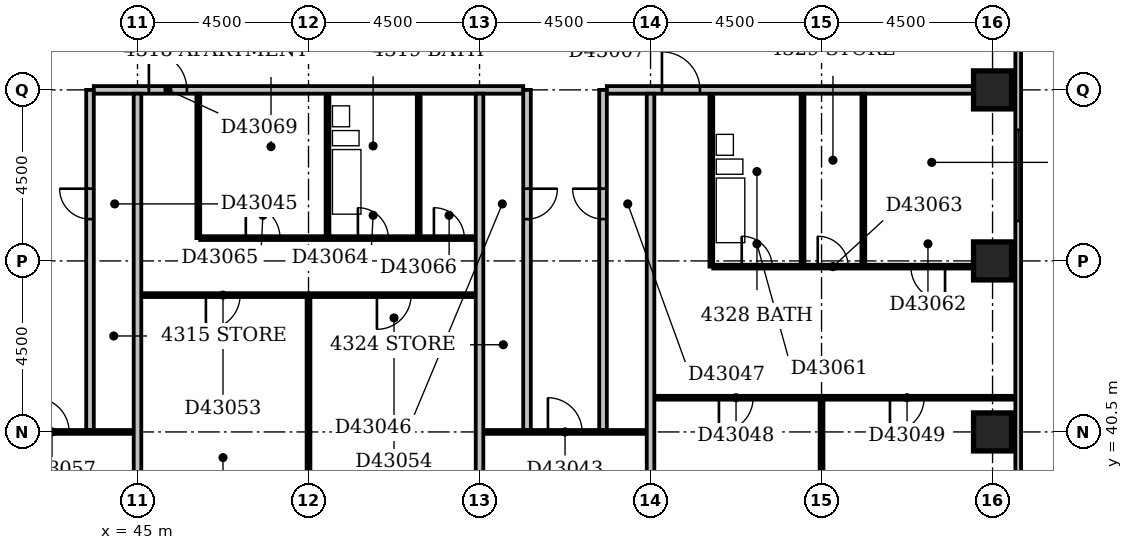
"""IFC4 building model, lengths in metres.
Left out: names, types, materials, properties, quantities, classifications, styles, units other than length and angle.
Written with IfcOpenShell. Run it as: python <this file> out.ifc"""

import sys

from ifc_helpers import new_model, si_unit, direction, frame, frame_2d, origin, origin_2d, place, context, subcontext, project, spatial, rectangle, extrude, element, fill, save


model = new_model("IFC4")
c1 = context("Model", 3, precision=1e-05, world=origin(), true_north=direction((0.0, 1.0)))
c2 = subcontext(c1, "Body", "Model", "MODEL_VIEW")
j1 = project(units=[si_unit("LENGTHUNIT", "METRE"), si_unit("PLANEANGLEUNIT", "RADIAN")], contexts=[c1])
p1 = place(None, origin())
s1 = spatial("IfcSite", under=j1, at=p1, CompositionType="ELEMENT")
p2 = place(p1, origin())
s2 = spatial("IfcBuilding", under=s1, at=p2, CompositionType="ELEMENT")
p3 = place(p2, frame((0.0, 0.0, 170.0)))
s3 = spatial("IfcBuildingStorey", under=s2, at=p3, CompositionType="ELEMENT", Elevation=170.0)
for number, where, z_axis, x_axis in (
    (1, (67.5, 40.5, -0.3), (0.0, 0.0, 1.0), (1.0, 0.0, 0.0)),
    (2, (67.5, 45.0, -0.3), (0.0, 0.0, 1.0), (1.0, 0.0, 0.0)),
    (3, (67.5, 49.5, -0.3), (0.0, 0.0, 1.0), (1.0, 0.0, 0.0)),
):
    element("IfcColumn", number, at=place(p3, frame(where, z_axis=z_axis, x_axis=x_axis)), inside=s3, PredefinedType="COLUMN", context=c2, shape_type="SweptSolid", body=[
        extrude(rectangle(XDim=1.0, YDim=1.0, at=origin_2d()), origin(), (0.0, 0.0, 1.0), 3.45),
    ])
p4 = place(p3, frame((68.175, 35.4, 0.0), z_axis=(0.0, 0.0, 1.0), x_axis=(0.0, 1.0, 0.0)))
e4 = element("IfcWall", 4, at=p4, inside=s3, PredefinedType="STANDARD", context=c2, shape_type="SweptSolid", body=[
    extrude(rectangle(XDim=23.85, YDim=0.15, at=frame_2d((11.925, 0.0))), origin(), (0.0, 0.0, 1.0), 2.5),
])
p5 = place(p4, frame((1.65, 0.0, 0.6)))
e5 = element("IfcOpeningElement", 5, at=p5, cuts=e4, PredefinedType="OPENING", context=c2, shape_type="SweptSolid", body=[
    extrude(rectangle(XDim=2.4, YDim=1.8, at=frame_2d((1.2, 0.9))), frame((0.0, 0.087, 0.0), z_axis=(0.0, -1.0, 0.0), x_axis=(1.0, 0.0, 0.0)), (0.0, 0.0, 1.0), 0.174),
])
p6 = place(p4, frame((10.65, 0.0, 0.6)))
e6 = element("IfcOpeningElement", 6, at=p6, cuts=e4, PredefinedType="OPENING", context=c2, shape_type="SweptSolid", body=[
    extrude(rectangle(XDim=2.4, YDim=1.8, at=frame_2d((1.2, 0.9))), frame((0.0, 0.087, 0.0), z_axis=(0.0, -1.0, 0.0), x_axis=(1.0, 0.0, 0.0)), (0.0, 0.0, 1.0), 0.174),
])
p7 = place(p4, frame((19.65, 0.0, 0.6)))
e7 = element("IfcOpeningElement", 7, at=p7, cuts=e4, PredefinedType="OPENING", context=c2, shape_type="SweptSolid", body=[
    extrude(rectangle(XDim=2.4, YDim=1.8, at=frame_2d((1.2, 0.9))), frame((0.0, 0.087, 0.0), z_axis=(0.0, -1.0, 0.0), x_axis=(1.0, 0.0, 0.0)), (0.0, 0.0, 1.0), 0.174),
])
p8 = place(p3, frame((45.0, 36.5, 0.0), z_axis=(0.0, 0.0, 1.0), x_axis=(0.0, 1.0, 0.0)))
e8 = element("IfcWall", 8, at=p8, inside=s3, PredefinedType="PARTITIONING", context=c2, shape_type="SweptSolid", body=[
    extrude(rectangle(XDim=12.9, YDim=0.2, at=frame_2d((6.45, 0.0))), origin(), (0.0, 0.0, 1.0), 2.45),
])
p9 = place(p3, frame((49.5, 36.5, 0.0), z_axis=(0.0, 0.0, 1.0), x_axis=(0.0, 1.0, 0.0)))
e9 = element("IfcWall", 9, at=p9, inside=s3, PredefinedType="PARTITIONING", context=c2, shape_type="SweptSolid", body=[
    extrude(rectangle(XDim=7.55, YDim=0.1, at=frame_2d((3.775, 0.0))), origin(), (0.0, 0.0, 1.0), 3.15),
])
p10 = place(p3, frame((54.0, 36.5, 0.0), z_axis=(0.0, 0.0, 1.0), x_axis=(0.0, 1.0, 0.0)))
e10 = element("IfcWall", 10, at=p10, inside=s3, PredefinedType="PARTITIONING", context=c2, shape_type="SweptSolid", body=[
    extrude(rectangle(XDim=12.9, YDim=0.2, at=frame_2d((6.45, 0.0))), origin(), (0.0, 0.0, 1.0), 2.45),
])
p11 = place(p3, frame((58.5, 36.5, 0.0), z_axis=(0.0, 0.0, 1.0), x_axis=(0.0, 1.0, 0.0)))
e11 = element("IfcWall", 11, at=p11, inside=s3, PredefinedType="PARTITIONING", context=c2, shape_type="SweptSolid", body=[
    extrude(rectangle(XDim=12.9, YDim=0.2, at=frame_2d((6.45, 0.0))), origin(), (0.0, 0.0, 1.0), 3.15),
])
p12 = place(p3, frame((63.0, 36.5, 0.0), z_axis=(0.0, 0.0, 1.0), x_axis=(0.0, 1.0, 0.0)))
e12 = element("IfcWall", 12, at=p12, inside=s3, PredefinedType="PARTITIONING", context=c2, shape_type="SweptSolid", body=[
    extrude(rectangle(XDim=4.85, YDim=0.1, at=frame_2d((2.425, 0.0))), origin(), (0.0, 0.0, 1.0), 2.25),
])
p13 = place(p3, frame((40.6, 40.5, 0.0), z_axis=(0.0, 0.0, 1.0), x_axis=(1.0, 0.0, 0.0)))
e13 = element("IfcWall", 13, at=p13, inside=s3, PredefinedType="PARTITIONING", context=c2, shape_type="SweptSolid", body=[
    extrude(rectangle(XDim=4.3, YDim=0.1, at=frame_2d((2.15, 0.0))), origin(), (0.0, 0.0, 1.0), 3.15),
])
p14 = place(p13, frame((1.7, 0.0, 0.0)))
e14 = element("IfcOpeningElement", 14, at=p14, cuts=e13, PredefinedType="OPENING", context=c2, shape_type="SweptSolid", body=[
    extrude(rectangle(XDim=0.9, YDim=2.1, at=frame_2d((0.45, 1.05))), frame((0.0, 0.062, 0.0), z_axis=(0.0, -1.0, 0.0), x_axis=(1.0, 0.0, 0.0)), (0.0, 0.0, 1.0), 0.124),
])
p15 = place(p3, frame((54.1, 40.5, 0.0), z_axis=(0.0, 0.0, 1.0), x_axis=(1.0, 0.0, 0.0)))
e15 = element("IfcWall", 15, at=p15, inside=s3, PredefinedType="PARTITIONING", context=c2, shape_type="SweptSolid", body=[
    extrude(rectangle(XDim=4.3, YDim=0.1, at=frame_2d((2.15, 0.0))), origin(), (0.0, 0.0, 1.0), 3.15),
])
p16 = place(p15, frame((1.7, 0.0, 0.0)))
e16 = element("IfcOpeningElement", 16, at=p16, cuts=e15, PredefinedType="OPENING", context=c2, shape_type="SweptSolid", body=[
    extrude(rectangle(XDim=0.9, YDim=2.1, at=frame_2d((0.45, 1.05))), frame((0.0, 0.062, 0.0), z_axis=(0.0, -1.0, 0.0), x_axis=(1.0, 0.0, 0.0)), (0.0, 0.0, 1.0), 0.124),
])
p17 = place(p3, frame((43.75, 40.55, 0.0), z_axis=(0.0, 0.0, 1.0), x_axis=(0.0, 1.0, 0.0)))
e17 = element("IfcWall", 17, at=p17, inside=s3, PredefinedType="PARTITIONING", context=c2, shape_type="SweptSolid", body=[
    extrude(rectangle(XDim=8.95, YDim=0.2, at=frame_2d((4.475, 0.0))), origin(), (0.0, 0.0, 1.0), 3.15),
])
p18 = place(p17, frame((5.55, 0.0, 0.0)))
e18 = element("IfcOpeningElement", 18, at=p18, cuts=e17, PredefinedType="OPENING", context=c2, shape_type="SweptSolid", body=[
    extrude(rectangle(XDim=0.8, YDim=2.1, at=frame_2d((0.4, 1.05))), frame((0.0, 0.112, 0.0), z_axis=(0.0, -1.0, 0.0), x_axis=(1.0, 0.0, 0.0)), (0.0, 0.0, 1.0), 0.224),
])
p19 = place(p3, frame((55.25, 40.55, 0.0), z_axis=(0.0, 0.0, 1.0), x_axis=(0.0, 1.0, 0.0)))
e19 = element("IfcWall", 19, at=p19, inside=s3, PredefinedType="PARTITIONING", context=c2, shape_type="SweptSolid", body=[
    extrude(rectangle(XDim=8.95, YDim=0.2, at=frame_2d((4.475, 0.0))), origin(), (0.0, 0.0, 1.0), 3.15),
])
p20 = place(p19, frame((5.55, 0.0, 0.0)))
e20 = element("IfcOpeningElement", 20, at=p20, cuts=e19, PredefinedType="OPENING", context=c2, shape_type="SweptSolid", body=[
    extrude(rectangle(XDim=0.8, YDim=2.1, at=frame_2d((0.4, 1.05))), frame((0.0, 0.112, 0.0), z_axis=(0.0, -1.0, 0.0), x_axis=(1.0, 0.0, 0.0)), (0.0, 0.0, 1.0), 0.224),
])
p21 = place(p3, frame((57.25, 40.55, 0.0), z_axis=(0.0, 0.0, 1.0), x_axis=(0.0, 1.0, 0.0)))
e21 = element("IfcWall", 21, at=p21, inside=s3, PredefinedType="PARTITIONING", context=c2, shape_type="SweptSolid", body=[
    extrude(rectangle(XDim=8.95, YDim=0.2, at=frame_2d((4.475, 0.0))), origin(), (0.0, 0.0, 1.0), 3.15),
])
p22 = place(p21, frame((5.55, 0.0, 0.0)))
e22 = element("IfcOpeningElement", 22, at=p22, cuts=e21, PredefinedType="OPENING", context=c2, shape_type="SweptSolid", body=[
    extrude(rectangle(XDim=0.8, YDim=2.1, at=frame_2d((0.4, 1.05))), frame((0.0, 0.112, 0.0), z_axis=(0.0, -1.0, 0.0), x_axis=(1.0, 0.0, 0.0)), (0.0, 0.0, 1.0), 0.224),
])
p23 = place(p3, frame((58.6, 41.4, 0.0), z_axis=(0.0, 0.0, 1.0), x_axis=(1.0, 0.0, 0.0)))
e23 = element("IfcWall", 23, at=p23, inside=s3, PredefinedType="PARTITIONING", context=c2, shape_type="SweptSolid", body=[
    extrude(rectangle(XDim=9.5, YDim=0.1, at=frame_2d((4.75, 0.0))), origin(), (0.0, 0.0, 1.0), 3.15),
])
p24 = place(p23, frame((1.7, 0.0, 0.0)))
e24 = element("IfcOpeningElement", 24, at=p24, cuts=e23, PredefinedType="OPENING", context=c2, shape_type="SweptSolid", body=[
    extrude(rectangle(XDim=0.9, YDim=2.1, at=frame_2d((0.45, 1.05))), frame((0.0, 0.062, 0.0), z_axis=(0.0, -1.0, 0.0), x_axis=(1.0, 0.0, 0.0)), (0.0, 0.0, 1.0), 0.124),
])
p25 = place(p23, frame((6.2, 0.0, 0.0)))
e25 = element("IfcOpeningElement", 25, at=p25, cuts=e23, PredefinedType="OPENING", context=c2, shape_type="SweptSolid", body=[
    extrude(rectangle(XDim=0.9, YDim=2.1, at=frame_2d((0.45, 1.05))), frame((0.0, 0.062, 0.0), z_axis=(0.0, -1.0, 0.0), x_axis=(1.0, 0.0, 0.0)), (0.0, 0.0, 1.0), 0.124),
])
p26 = place(p3, frame((45.1, 44.1, 0.0), z_axis=(0.0, 0.0, 1.0), x_axis=(1.0, 0.0, 0.0)))
e26 = element("IfcWall", 26, at=p26, inside=s3, PredefinedType="PARTITIONING", context=c2, shape_type="SweptSolid", body=[
    extrude(rectangle(XDim=8.8, YDim=0.1, at=frame_2d((4.4, 0.0))), origin(), (0.0, 0.0, 1.0), 3.15),
])
p27 = place(p26, frame((1.7, 0.0, 0.0)))
e27 = element("IfcOpeningElement", 27, at=p27, cuts=e26, PredefinedType="OPENING", context=c2, shape_type="SweptSolid", body=[
    extrude(rectangle(XDim=0.9, YDim=2.1, at=frame_2d((0.45, 1.05))), frame((0.0, 0.062, 0.0), z_axis=(0.0, -1.0, 0.0), x_axis=(1.0, 0.0, 0.0)), (0.0, 0.0, 1.0), 0.124),
])
p28 = place(p26, frame((6.2, 0.0, 0.0)))
e28 = element("IfcOpeningElement", 28, at=p28, cuts=e26, PredefinedType="OPENING", context=c2, shape_type="SweptSolid", body=[
    extrude(rectangle(XDim=0.9, YDim=2.1, at=frame_2d((0.45, 1.05))), frame((0.0, 0.062, 0.0), z_axis=(0.0, -1.0, 0.0), x_axis=(1.0, 0.0, 0.0)), (0.0, 0.0, 1.0), 0.124),
])
p29 = place(p3, frame((60.1, 44.85, 0.0), z_axis=(0.0, 0.0, 1.0), x_axis=(0.0, 1.0, 0.0)))
e29 = element("IfcWall", 29, at=p29, inside=s3, PredefinedType="PLUMBINGWALL", context=c2, shape_type="SweptSolid", body=[
    extrude(rectangle(XDim=4.55, YDim=0.1, at=frame_2d((2.275, 0.0))), origin(), (0.0, 0.0, 1.0), 3.15),
])
p30 = place(p3, frame((60.15, 44.85, 0.0), z_axis=(0.0, 0.0, 1.0), x_axis=(1.0, 0.0, 0.0)))
e30 = element("IfcWall", 30, at=p30, inside=s3, PredefinedType="PARTITIONING", context=c2, shape_type="SweptSolid", body=[
    extrude(rectangle(XDim=6.85, YDim=0.1, at=frame_2d((3.425, 0.0))), origin(), (0.0, 0.0, 1.0), 3.15),
])
p31 = place(p30, frame((0.75, 0.0, 0.0)))
e31 = element("IfcOpeningElement", 31, at=p31, cuts=e30, PredefinedType="OPENING", context=c2, shape_type="SweptSolid", body=[
    extrude(rectangle(XDim=0.8, YDim=2.1, at=frame_2d((0.4, 1.05))), frame((0.0, 0.062, 0.0), z_axis=(0.0, -1.0, 0.0), x_axis=(1.0, 0.0, 0.0)), (0.0, 0.0, 1.0), 0.124),
])
p32 = place(p30, frame((5.2, 0.0, 0.0)))
e32 = element("IfcOpeningElement", 32, at=p32, cuts=e30, PredefinedType="OPENING", context=c2, shape_type="SweptSolid", body=[
    extrude(rectangle(XDim=0.9, YDim=2.1, at=frame_2d((0.45, 1.05))), frame((0.0, 0.062, 0.0), z_axis=(0.0, -1.0, 0.0), x_axis=(1.0, 0.0, 0.0)), (0.0, 0.0, 1.0), 0.124),
])
p33 = place(p30, frame((2.75, 0.0, 0.0)))
e33 = element("IfcOpeningElement", 33, at=p33, cuts=e30, PredefinedType="OPENING", context=c2, shape_type="SweptSolid", body=[
    extrude(rectangle(XDim=0.8, YDim=2.1, at=frame_2d((0.4, 1.05))), frame((0.0, 0.062, 0.0), z_axis=(0.0, -1.0, 0.0), x_axis=(1.0, 0.0, 0.0)), (0.0, 0.0, 1.0), 0.124),
])
p34 = place(p3, frame((62.5, 44.9, 0.0), z_axis=(0.0, 0.0, 1.0), x_axis=(0.0, 1.0, 0.0)))
e34 = element("IfcWall", 34, at=p34, inside=s3, PredefinedType="PLUMBINGWALL", context=c2, shape_type="SweptSolid", body=[
    extrude(rectangle(XDim=4.5, YDim=0.1, at=frame_2d((2.25, 0.0))), origin(), (0.0, 0.0, 1.0), 2.25),
])
p35 = place(p3, frame((64.1, 44.9, 0.0), z_axis=(0.0, 0.0, 1.0), x_axis=(0.0, 1.0, 0.0)))
e35 = element("IfcWall", 35, at=p35, inside=s3, PredefinedType="PARTITIONING", context=c2, shape_type="SweptSolid", body=[
    extrude(rectangle(XDim=4.5, YDim=0.1, at=frame_2d((2.25, 0.0))), origin(), (0.0, 0.0, 1.0), 3.15),
])
p36 = place(p3, frame((46.6, 45.6, 0.0), z_axis=(0.0, 0.0, 1.0), x_axis=(0.0, 1.0, 0.0)))
e36 = element("IfcWall", 36, at=p36, inside=s3, PredefinedType="PARTITIONING", context=c2, shape_type="SweptSolid", body=[
    extrude(rectangle(XDim=3.8, YDim=0.1, at=frame_2d((1.9, 0.0))), origin(), (0.0, 0.0, 1.0), 3.15),
])
p37 = place(p3, frame((46.65, 45.6, 0.0), z_axis=(0.0, 0.0, 1.0), x_axis=(1.0, 0.0, 0.0)))
e37 = element("IfcWall", 37, at=p37, inside=s3, PredefinedType="PARTITIONING", context=c2, shape_type="SweptSolid", body=[
    extrude(rectangle(XDim=7.25, YDim=0.1, at=frame_2d((3.625, 0.0))), origin(), (0.0, 0.0, 1.0), 3.15),
])
p38 = place(p37, frame((4.15, 0.0, 0.0)))
e38 = element("IfcOpeningElement", 38, at=p38, cuts=e37, PredefinedType="OPENING", context=c2, shape_type="SweptSolid", body=[
    extrude(rectangle(XDim=0.8, YDim=2.1, at=frame_2d((0.4, 1.05))), frame((0.0, 0.062, 0.0), z_axis=(0.0, -1.0, 0.0), x_axis=(1.0, 0.0, 0.0)), (0.0, 0.0, 1.0), 0.124),
])
p39 = place(p37, frame((1.2, 0.0, 0.0)))
e39 = element("IfcOpeningElement", 39, at=p39, cuts=e37, PredefinedType="OPENING", context=c2, shape_type="SweptSolid", body=[
    extrude(rectangle(XDim=0.9, YDim=2.1, at=frame_2d((0.45, 1.05))), frame((0.0, 0.062, 0.0), z_axis=(0.0, -1.0, 0.0), x_axis=(1.0, 0.0, 0.0)), (0.0, 0.0, 1.0), 0.124),
])
p40 = place(p37, frame((6.15, 0.0, 0.0)))
e40 = element("IfcOpeningElement", 40, at=p40, cuts=e37, PredefinedType="OPENING", context=c2, shape_type="SweptSolid", body=[
    extrude(rectangle(XDim=0.8, YDim=2.1, at=frame_2d((0.4, 1.05))), frame((0.0, 0.062, 0.0), z_axis=(0.0, -1.0, 0.0), x_axis=(1.0, 0.0, 0.0)), (0.0, 0.0, 1.0), 0.124),
])
for number, where, z_axis, x_axis in (
    (41, (50.0, 45.65, 0.0), (0.0, 0.0, 1.0), (0.0, 1.0, 0.0)),
    (42, (52.4, 45.65, 0.0), (0.0, 0.0, 1.0), (0.0, 1.0, 0.0)),
):
    element("IfcWall", number, at=place(p3, frame(where, z_axis=z_axis, x_axis=x_axis)), inside=s3, PredefinedType="PLUMBINGWALL", context=c2, shape_type="SweptSolid", body=[
        extrude(rectangle(XDim=3.75, YDim=0.1, at=frame_2d((1.875, 0.0))), origin(), (0.0, 0.0, 1.0), 3.15),
    ])
p41 = place(p3, frame((43.85, 49.5, 0.0), z_axis=(0.0, 0.0, 1.0), x_axis=(1.0, 0.0, 0.0)))
e43 = element("IfcWall", 43, at=p41, inside=s3, PredefinedType="PARTITIONING", context=c2, shape_type="SweptSolid", body=[
    extrude(rectangle(XDim=11.3, YDim=0.2, at=frame_2d((5.65, 0.0))), origin(), (0.0, 0.0, 1.0), 3.15),
])
p42 = place(p41, frame((1.45, 0.0, 0.0)))
e44 = element("IfcOpeningElement", 44, at=p42, cuts=e43, PredefinedType="OPENING", context=c2, shape_type="SweptSolid", body=[
    extrude(rectangle(XDim=1.0, YDim=2.1, at=frame_2d((0.5, 1.05))), frame((0.0, 0.112, 0.0), z_axis=(0.0, -1.0, 0.0), x_axis=(1.0, 0.0, 0.0)), (0.0, 0.0, 1.0), 0.224),
])
p43 = place(p3, frame((57.35, 49.5, 0.0), z_axis=(0.0, 0.0, 1.0), x_axis=(1.0, 0.0, 0.0)))
e45 = element("IfcWall", 45, at=p43, inside=s3, PredefinedType="PARTITIONING", context=c2, shape_type="SweptSolid", body=[
    extrude(rectangle(XDim=9.65, YDim=0.2, at=frame_2d((4.825, 0.0))), origin(), (0.0, 0.0, 1.0), 3.15),
])
p44 = place(p43, frame((1.45, 0.0, 0.0)))
e46 = element("IfcOpeningElement", 46, at=p44, cuts=e45, PredefinedType="OPENING", context=c2, shape_type="SweptSolid", body=[
    extrude(rectangle(XDim=1.0, YDim=2.1, at=frame_2d((0.5, 1.05))), frame((0.0, 0.112, 0.0), z_axis=(0.0, -1.0, 0.0), x_axis=(1.0, 0.0, 0.0)), (0.0, 0.0, 1.0), 0.224),
])
p45 = place(p6, origin())
e47 = element("IfcWindow", 47, at=p45, inside=s3, PartitioningType="SINGLE_PANEL", PredefinedType="WINDOW", context=c2, shape_type="SweptSolid", body=[
    extrude(rectangle(XDim=2.4, YDim=1.8, at=frame_2d((1.2, 0.9))), frame((0.0, 0.03, 0.0), z_axis=(0.0, -1.0, 0.0), x_axis=(1.0, 0.0, 0.0)), (0.0, 0.0, 1.0), 0.06),
])
fill(e6, e47)
p46 = place(p14, origin())
e48 = element("IfcDoor", 48, at=p46, inside=s3, OperationType="SINGLE_SWING_LEFT", PredefinedType="DOOR", context=c2, shape_type="SweptSolid", body=[
    extrude(rectangle(XDim=0.9, YDim=2.1, at=frame_2d((0.45, 1.05))), frame((0.0, 0.025, 0.0), z_axis=(0.0, -1.0, 0.0), x_axis=(1.0, 0.0, 0.0)), (0.0, 0.0, 1.0), 0.05),
])
fill(e14, e48)
p47 = place(p16, origin())
e49 = element("IfcDoor", 49, at=p47, inside=s3, OperationType="SINGLE_SWING_LEFT", PredefinedType="DOOR", context=c2, shape_type="SweptSolid", body=[
    extrude(rectangle(XDim=0.9, YDim=2.1, at=frame_2d((0.45, 1.05))), frame((0.0, 0.025, 0.0), z_axis=(0.0, -1.0, 0.0), x_axis=(1.0, 0.0, 0.0)), (0.0, 0.0, 1.0), 0.05),
])
fill(e16, e49)
p48 = place(p18, frame((0.8, 0.0, 0.0), z_axis=(0.0, 0.0, 1.0), x_axis=(-1.0, 0.0, 0.0)))
e50 = element("IfcDoor", 50, at=p48, inside=s3, OperationType="SINGLE_SWING_LEFT", PredefinedType="DOOR", context=c2, shape_type="SweptSolid", body=[
    extrude(rectangle(XDim=0.8, YDim=2.1, at=frame_2d((0.4, 1.05))), frame((0.0, 0.025, 0.0), z_axis=(0.0, -1.0, 0.0), x_axis=(1.0, 0.0, 0.0)), (0.0, 0.0, 1.0), 0.05),
])
fill(e18, e50)
p49 = place(p20, origin())
e51 = element("IfcDoor", 51, at=p49, inside=s3, OperationType="SINGLE_SWING_RIGHT", PredefinedType="DOOR", context=c2, shape_type="SweptSolid", body=[
    extrude(rectangle(XDim=0.8, YDim=2.1, at=frame_2d((0.4, 1.05))), frame((0.0, 0.025, 0.0), z_axis=(0.0, -1.0, 0.0), x_axis=(1.0, 0.0, 0.0)), (0.0, 0.0, 1.0), 0.05),
])
fill(e20, e51)
p50 = place(p22, frame((0.8, 0.0, 0.0), z_axis=(0.0, 0.0, 1.0), x_axis=(-1.0, 0.0, 0.0)))
e52 = element("IfcDoor", 52, at=p50, inside=s3, OperationType="SINGLE_SWING_LEFT", PredefinedType="DOOR", context=c2, shape_type="SweptSolid", body=[
    extrude(rectangle(XDim=0.8, YDim=2.1, at=frame_2d((0.4, 1.05))), frame((0.0, 0.025, 0.0), z_axis=(0.0, -1.0, 0.0), x_axis=(1.0, 0.0, 0.0)), (0.0, 0.0, 1.0), 0.05),
])
fill(e22, e52)
p51 = place(p24, frame((0.9, 0.0, 0.0), z_axis=(0.0, 0.0, 1.0), x_axis=(-1.0, 0.0, 0.0)))
e53 = element("IfcDoor", 53, at=p51, inside=s3, OperationType="SINGLE_SWING_RIGHT", PredefinedType="DOOR", context=c2, shape_type="SweptSolid", body=[
    extrude(rectangle(XDim=0.9, YDim=2.1, at=frame_2d((0.45, 1.05))), frame((0.0, 0.025, 0.0), z_axis=(0.0, -1.0, 0.0), x_axis=(1.0, 0.0, 0.0)), (0.0, 0.0, 1.0), 0.05),
])
fill(e24, e53)
p52 = place(p25, frame((0.9, 0.0, 0.0), z_axis=(0.0, 0.0, 1.0), x_axis=(-1.0, 0.0, 0.0)))
e54 = element("IfcDoor", 54, at=p52, inside=s3, OperationType="SINGLE_SWING_RIGHT", PredefinedType="DOOR", context=c2, shape_type="SweptSolid", body=[
    extrude(rectangle(XDim=0.9, YDim=2.1, at=frame_2d((0.45, 1.05))), frame((0.0, 0.025, 0.0), z_axis=(0.0, -1.0, 0.0), x_axis=(1.0, 0.0, 0.0)), (0.0, 0.0, 1.0), 0.05),
])
fill(e25, e54)
p53 = place(p27, frame((0.9, 0.0, 0.0), z_axis=(0.0, 0.0, 1.0), x_axis=(-1.0, 0.0, 0.0)))
e55 = element("IfcDoor", 55, at=p53, inside=s3, OperationType="SINGLE_SWING_RIGHT", PredefinedType="DOOR", context=c2, shape_type="SweptSolid", body=[
    extrude(rectangle(XDim=0.9, YDim=2.1, at=frame_2d((0.45, 1.05))), frame((0.0, 0.025, 0.0), z_axis=(0.0, -1.0, 0.0), x_axis=(1.0, 0.0, 0.0)), (0.0, 0.0, 1.0), 0.05),
])
fill(e27, e55)
p54 = place(p28, frame((0.9, 0.0, 0.0), z_axis=(0.0, 0.0, 1.0), x_axis=(-1.0, 0.0, 0.0)))
e56 = element("IfcDoor", 56, at=p54, inside=s3, OperationType="SINGLE_SWING_RIGHT", PredefinedType="DOOR", context=c2, shape_type="SweptSolid", body=[
    extrude(rectangle(XDim=0.9, YDim=2.1, at=frame_2d((0.45, 1.05))), frame((0.0, 0.025, 0.0), z_axis=(0.0, -1.0, 0.0), x_axis=(1.0, 0.0, 0.0)), (0.0, 0.0, 1.0), 0.05),
])
fill(e28, e56)
p55 = place(p31, origin())
e57 = element("IfcDoor", 57, at=p55, inside=s3, OperationType="SINGLE_SWING_LEFT", PredefinedType="DOOR", context=c2, shape_type="SweptSolid", body=[
    extrude(rectangle(XDim=0.8, YDim=2.1, at=frame_2d((0.4, 1.05))), frame((0.0, 0.025, 0.0), z_axis=(0.0, -1.0, 0.0), x_axis=(1.0, 0.0, 0.0)), (0.0, 0.0, 1.0), 0.05),
])
fill(e31, e57)
p56 = place(p32, origin())
e58 = element("IfcDoor", 58, at=p56, inside=s3, OperationType="SINGLE_SWING_RIGHT", PredefinedType="DOOR", context=c2, shape_type="SweptSolid", body=[
    extrude(rectangle(XDim=0.9, YDim=2.1, at=frame_2d((0.45, 1.05))), frame((0.0, 0.025, 0.0), z_axis=(0.0, -1.0, 0.0), x_axis=(1.0, 0.0, 0.0)), (0.0, 0.0, 1.0), 0.05),
])
fill(e32, e58)
p57 = place(p33, origin())
e59 = element("IfcDoor", 59, at=p57, inside=s3, OperationType="SINGLE_SWING_LEFT", PredefinedType="DOOR", context=c2, shape_type="SweptSolid", body=[
    extrude(rectangle(XDim=0.8, YDim=2.1, at=frame_2d((0.4, 1.05))), frame((0.0, 0.025, 0.0), z_axis=(0.0, -1.0, 0.0), x_axis=(1.0, 0.0, 0.0)), (0.0, 0.0, 1.0), 0.05),
])
fill(e33, e59)
p58 = place(p38, origin())
e60 = element("IfcDoor", 60, at=p58, inside=s3, OperationType="SINGLE_SWING_LEFT", PredefinedType="DOOR", context=c2, shape_type="SweptSolid", body=[
    extrude(rectangle(XDim=0.8, YDim=2.1, at=frame_2d((0.4, 1.05))), frame((0.0, 0.025, 0.0), z_axis=(0.0, -1.0, 0.0), x_axis=(1.0, 0.0, 0.0)), (0.0, 0.0, 1.0), 0.05),
])
fill(e38, e60)
p59 = place(p39, origin())
e61 = element("IfcDoor", 61, at=p59, inside=s3, OperationType="SINGLE_SWING_LEFT", PredefinedType="DOOR", context=c2, shape_type="SweptSolid", body=[
    extrude(rectangle(XDim=0.9, YDim=2.1, at=frame_2d((0.45, 1.05))), frame((0.0, 0.025, 0.0), z_axis=(0.0, -1.0, 0.0), x_axis=(1.0, 0.0, 0.0)), (0.0, 0.0, 1.0), 0.05),
])
fill(e39, e61)
p60 = place(p40, origin())
e62 = element("IfcDoor", 62, at=p60, inside=s3, OperationType="SINGLE_SWING_LEFT", PredefinedType="DOOR", context=c2, shape_type="SweptSolid", body=[
    extrude(rectangle(XDim=0.8, YDim=2.1, at=frame_2d((0.4, 1.05))), frame((0.0, 0.025, 0.0), z_axis=(0.0, -1.0, 0.0), x_axis=(1.0, 0.0, 0.0)), (0.0, 0.0, 1.0), 0.05),
])
fill(e40, e62)
p61 = place(p42, origin())
e63 = element("IfcDoor", 63, at=p61, inside=s3, OperationType="SINGLE_SWING_LEFT", PredefinedType="DOOR", context=c2, shape_type="SweptSolid", body=[
    extrude(rectangle(XDim=1.0, YDim=2.1, at=frame_2d((0.5, 1.05))), frame((0.0, 0.025, 0.0), z_axis=(0.0, -1.0, 0.0), x_axis=(1.0, 0.0, 0.0)), (0.0, 0.0, 1.0), 0.05),
])
fill(e44, e63)
p62 = place(p44, origin())
e64 = element("IfcDoor", 64, at=p62, inside=s3, OperationType="SINGLE_SWING_LEFT", PredefinedType="DOOR", context=c2, shape_type="SweptSolid", body=[
    extrude(rectangle(XDim=1.0, YDim=2.1, at=frame_2d((0.5, 1.05))), frame((0.0, 0.025, 0.0), z_axis=(0.0, -1.0, 0.0), x_axis=(1.0, 0.0, 0.0)), (0.0, 0.0, 1.0), 0.05),
])
fill(e46, e64)
save(model, sys.argv[1])
